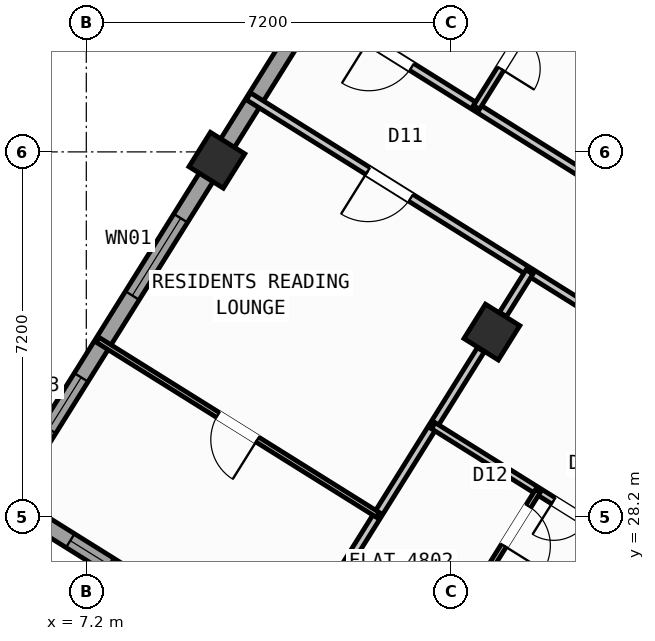
"""IFC4 building model, lengths in metres.
Left out: names, types, materials, properties, quantities, classifications, styles, units other than length and angle.
Written with IfcOpenShell. Run it as: python <this file> out.ifc"""

import sys

from ifc_helpers import new_model, si_unit, direction, frame, frame_2d, origin, origin_2d, place, context, subcontext, project, spatial, rectangle, hollow_rectangle, extrude, source, transform, mapped, element, fill, save


model = new_model("IFC4")
c1 = context("Model", 3, precision=1e-05, world=origin(), true_north=direction((0.0, 1.0)))
c2 = subcontext(c1, "Body", "Model", "MODEL_VIEW")
j1 = project(units=[si_unit("LENGTHUNIT", "METRE"), si_unit("PLANEANGLEUNIT", "RADIAN")], contexts=[c1])
p1 = place(None, origin())
s1 = spatial("IfcSite", under=j1, at=p1, CompositionType="ELEMENT")
p2 = place(p1, origin())
s2 = spatial("IfcBuilding", under=s1, at=p2, CompositionType="ELEMENT")
p3 = place(p2, frame((0.0, 0.0, 191.4)))
s3 = spatial("IfcBuildingStorey", under=s2, at=p3, CompositionType="ELEMENT", Elevation=191.4)
m1 = source(origin(), c2, "Body", "SweptSolid", [
    extrude(hollow_rectangle(XDim=0.8, YDim=0.8, WallThickness=0.032, at=origin_2d()), origin(), (0.0, 0.0, 1.0), 3.6),
])
for number, where, z_axis, x_axis in (
    (1, (15.205, 31.844, 0.0), (0.0, 0.0, 1.0), (-0.848, 0.53, 0.0)),
    (2, (9.777, 35.235, 0.0), (0.0, 0.0, 1.0), (-0.848, 0.53, 0.0)),
):
    element("IfcColumn", number, at=place(p3, frame(where, z_axis=z_axis, x_axis=x_axis)), inside=s3, PredefinedType="COLUMN", context=c2, shape_type="MappedRepresentation", body=[
        mapped(m1, transform((0.0, 0.0, 0.0), scale=1.0)),
    ])
p4 = place(p3, frame((31.76, 12.183, 0.0), z_axis=(0.0, 0.0, 1.0), x_axis=(-0.848047074256, 0.529920899612, 0.0)))
e3 = element("IfcWall", 3, at=p4, inside=s3, PredefinedType="STANDARD", context=c2, shape_type="SweptSolid", body=[
    extrude(rectangle(XDim=30.652, YDim=0.32, at=frame_2d((15.326, 0.0))), origin(), (0.0, 0.0, 1.0), 3.32),
])
p5 = place(p4, frame((15.166, 0.0, 0.0)))
e4 = element("IfcOpeningElement", 4, at=p5, cuts=e3, PredefinedType="OPENING", context=c2, shape_type="SweptSolid", body=[
    extrude(rectangle(XDim=1.2, YDim=2.15, at=frame_2d((0.6, 1.075))), frame((0.0, 0.17, 0.0), z_axis=(0.0, -1.0, 0.0), x_axis=(1.0, 0.0, 0.0)), (0.0, 0.0, 1.0), 0.34),
])
p6 = place(p4, frame((2.015, 0.0, 0.8)))
e5 = element("IfcOpeningElement", 5, at=p6, cuts=e3, PredefinedType="OPENING", context=c2, shape_type="SweptSolid", body=[
    extrude(rectangle(XDim=2.1, YDim=1.55, at=frame_2d((1.05, 0.775))), frame((0.0, 0.17, 0.0), z_axis=(0.0, -1.0, 0.0), x_axis=(1.0, 0.0, 0.0)), (0.0, 0.0, 1.0), 0.34),
])
p7 = place(p4, frame((7.244, 0.0, 0.8)))
e6 = element("IfcOpeningElement", 6, at=p7, cuts=e3, PredefinedType="OPENING", context=c2, shape_type="SweptSolid", body=[
    extrude(rectangle(XDim=2.1, YDim=1.55, at=frame_2d((1.05, 0.775))), frame((0.0, 0.17, 0.0), z_axis=(0.0, -1.0, 0.0), x_axis=(1.0, 0.0, 0.0)), (0.0, 0.0, 1.0), 0.34),
])
p8 = place(p4, frame((12.623, 0.0, 1.0)))
e7 = element("IfcOpeningElement", 7, at=p8, cuts=e3, PredefinedType="OPENING", context=c2, shape_type="SweptSolid", body=[
    extrude(rectangle(XDim=0.9, YDim=1.25, at=frame_2d((0.45, 0.625))), frame((0.0, 0.17, 0.0), z_axis=(0.0, -1.0, 0.0), x_axis=(1.0, 0.0, 0.0)), (0.0, 0.0, 1.0), 0.34),
])
p9 = place(p4, frame((19.565, 0.0, 0.95)))
e8 = element("IfcOpeningElement", 8, at=p9, cuts=e3, PredefinedType="OPENING", context=c2, shape_type="SweptSolid", body=[
    extrude(rectangle(XDim=1.2, YDim=1.4, at=frame_2d((0.6, 0.7))), frame((0.0, 0.17, 0.0), z_axis=(0.0, -1.0, 0.0), x_axis=(1.0, 0.0, 0.0)), (0.0, 0.0, 1.0), 0.34),
])
p10 = place(p4, frame((25.983, 0.0, 1.0)))
e9 = element("IfcOpeningElement", 9, at=p10, cuts=e3, PredefinedType="OPENING", context=c2, shape_type="SweptSolid", body=[
    extrude(rectangle(XDim=0.9, YDim=1.25, at=frame_2d((0.45, 0.625))), frame((0.0, 0.17, 0.0), z_axis=(0.0, -1.0, 0.0), x_axis=(1.0, 0.0, 0.0)), (0.0, 0.0, 1.0), 0.34),
])
p11 = place(p4, frame((28.433, 0.0, 1.0)))
e10 = element("IfcOpeningElement", 10, at=p11, cuts=e3, PredefinedType="OPENING", context=c2, shape_type="SweptSolid", body=[
    extrude(rectangle(XDim=0.9, YDim=1.25, at=frame_2d((0.45, 0.625))), frame((0.0, 0.17, 0.0), z_axis=(0.0, -1.0, 0.0), x_axis=(1.0, 0.0, 0.0)), (0.0, 0.0, 1.0), 0.34),
])
p12 = place(p3, frame((5.7, 28.71, 0.0), z_axis=(0.0, 0.0, 1.0), x_axis=(0.529923711467, 0.8480453172, 0.0)))
e11 = element("IfcWall", 11, at=p12, inside=s3, PredefinedType="STANDARD", context=c2, shape_type="SweptSolid", body=[
    extrude(rectangle(XDim=21.587, YDim=0.32, at=frame_2d((10.794, 0.0))), origin(), (0.0, 0.0, 1.0), 2.795),
])
p13 = place(p12, frame((1.44, 0.0, 0.95)))
e12 = element("IfcOpeningElement", 12, at=p13, cuts=e11, PredefinedType="OPENING", context=c2, shape_type="SweptSolid", body=[
    extrude(rectangle(XDim=1.2, YDim=1.4, at=frame_2d((0.6, 0.7))), frame((0.0, 0.17, 0.0), z_axis=(0.0, -1.0, 0.0), x_axis=(1.0, 0.0, 0.0)), (0.0, 0.0, 1.0), 0.34),
])
p14 = place(p12, frame((4.545, 0.0, 0.85)))
e13 = element("IfcOpeningElement", 13, at=p14, cuts=e11, PredefinedType="OPENING", context=c2, shape_type="SweptSolid", body=[
    extrude(rectangle(XDim=1.8, YDim=1.5, at=frame_2d((0.9, 0.75))), frame((0.0, 0.17, 0.0), z_axis=(0.0, -1.0, 0.0), x_axis=(1.0, 0.0, 0.0)), (0.0, 0.0, 1.0), 0.34),
])
p15 = place(p12, frame((12.139, 0.0, 1.0)))
e14 = element("IfcOpeningElement", 14, at=p15, cuts=e11, PredefinedType="OPENING", context=c2, shape_type="SweptSolid", body=[
    extrude(rectangle(XDim=0.9, YDim=1.25, at=frame_2d((0.45, 0.625))), frame((0.0, 0.17, 0.0), z_axis=(0.0, -1.0, 0.0), x_axis=(1.0, 0.0, 0.0)), (0.0, 0.0, 1.0), 0.34),
])
p16 = place(p12, frame((16.35, 0.0, 0.95)))
e15 = element("IfcOpeningElement", 15, at=p16, cuts=e11, PredefinedType="OPENING", context=c2, shape_type="SweptSolid", body=[
    extrude(rectangle(XDim=1.2, YDim=1.4, at=frame_2d((0.6, 0.7))), frame((0.0, 0.17, 0.0), z_axis=(0.0, -1.0, 0.0), x_axis=(1.0, 0.0, 0.0)), (0.0, 0.0, 1.0), 0.34),
])
p17 = place(p12, frame((18.762, 0.0, 0.95)))
e16 = element("IfcOpeningElement", 16, at=p17, cuts=e11, PredefinedType="OPENING", context=c2, shape_type="SweptSolid", body=[
    extrude(rectangle(XDim=1.2, YDim=1.4, at=frame_2d((0.6, 0.7))), frame((0.0, 0.17, 0.0), z_axis=(0.0, -1.0, 0.0), x_axis=(1.0, 0.0, 0.0)), (0.0, 0.0, 1.0), 0.34),
])
p18 = place(p3, frame((25.754, 29.497, 0.0), z_axis=(0.0, 0.0, 1.0), x_axis=(-0.848045850158, 0.529922858565, 0.0)))
e17 = element("IfcWall", 17, at=p18, inside=s3, PredefinedType="PARTITIONING", context=c2, shape_type="SweptSolid", body=[
    extrude(rectangle(XDim=16.73, YDim=0.16, at=frame_2d((8.365, 0.0))), origin(), (0.0, 0.0, 1.0), 3.31),
])
p19 = place(p18, frame((2.22, 0.0, 0.0)))
e18 = element("IfcOpeningElement", 18, at=p19, cuts=e17, PredefinedType="OPENING", context=c2, shape_type="SweptSolid", body=[
    extrude(rectangle(XDim=0.86, YDim=2.05, at=frame_2d((0.43, 1.025))), frame((0.0, 0.09, 0.0), z_axis=(0.0, -1.0, 0.0), x_axis=(1.0, 0.0, 0.0)), (0.0, 0.0, 1.0), 0.18),
])
p20 = place(p18, frame((6.49, 0.0, 0.0)))
e19 = element("IfcOpeningElement", 19, at=p20, cuts=e17, PredefinedType="OPENING", context=c2, shape_type="SweptSolid", body=[
    extrude(rectangle(XDim=1.0, YDim=2.1, at=frame_2d((0.5, 1.05))), frame((0.0, 0.09, 0.0), z_axis=(0.0, -1.0, 0.0), x_axis=(1.0, 0.0, 0.0)), (0.0, 0.0, 1.0), 0.18),
])
p21 = place(p18, frame((14.304, 0.0, 0.0)))
e20 = element("IfcOpeningElement", 20, at=p21, cuts=e17, PredefinedType="OPENING", context=c2, shape_type="SweptSolid", body=[
    extrude(rectangle(XDim=1.0, YDim=2.1, at=frame_2d((0.5, 1.05))), frame((0.0, 0.09, 0.0), z_axis=(0.0, -1.0, 0.0), x_axis=(1.0, 0.0, 0.0)), (0.0, 0.0, 1.0), 0.18),
])
p22 = place(p3, frame((24.588, 27.631, 0.0), z_axis=(0.0, 0.0, 1.0), x_axis=(-0.848041752158, 0.529929416617, 0.0)))
e21 = element("IfcWall", 21, at=p22, inside=s3, PredefinedType="PARTITIONING", context=c2, shape_type="SweptSolid", body=[
    extrude(rectangle(XDim=16.73, YDim=0.16, at=frame_2d((8.365, 0.0))), origin(), (0.0, 0.0, 1.0), 3.31),
])
p23 = place(p22, frame((2.22, 0.0, 0.0)))
e22 = element("IfcOpeningElement", 22, at=p23, cuts=e21, PredefinedType="OPENING", context=c2, shape_type="SweptSolid", body=[
    extrude(rectangle(XDim=0.86, YDim=2.05, at=frame_2d((0.43, 1.025))), frame((0.0, 0.09, 0.0), z_axis=(0.0, -1.0, 0.0), x_axis=(1.0, 0.0, 0.0)), (0.0, 0.0, 1.0), 0.18),
])
p24 = place(p22, frame((7.82, 0.0, 0.0)))
e23 = element("IfcOpeningElement", 23, at=p24, cuts=e21, PredefinedType="OPENING", context=c2, shape_type="SweptSolid", body=[
    extrude(rectangle(XDim=1.0, YDim=2.1, at=frame_2d((0.5, 1.05))), frame((0.0, 0.09, 0.0), z_axis=(0.0, -1.0, 0.0), x_axis=(1.0, 0.0, 0.0)), (0.0, 0.0, 1.0), 0.18),
])
p25 = place(p22, frame((12.95, 0.0, 0.0)))
e24 = element("IfcOpeningElement", 24, at=p25, cuts=e21, PredefinedType="OPENING", context=c2, shape_type="SweptSolid", body=[
    extrude(rectangle(XDim=1.0, YDim=2.1, at=frame_2d((0.5, 1.05))), frame((0.0, 0.09, 0.0), z_axis=(0.0, -1.0, 0.0), x_axis=(1.0, 0.0, 0.0)), (0.0, 0.0, 1.0), 0.18),
])
p26 = place(p3, frame((15.946, 33.031, 0.0), z_axis=(0.0, 0.0, 1.0), x_axis=(-0.529821225456, -0.848109349704, 0.0)))
e25 = element("IfcWall", 25, at=p26, inside=s3, PredefinedType="PARTITIONING", context=c2, shape_type="SweptSolid", body=[
    extrude(rectangle(XDim=0.988, YDim=0.16, at=frame_2d((0.494, 0.0))), origin(), (0.0, 0.0, 1.0), 2.795),
])
p27 = place(p3, frame((14.986, 31.494, 0.0), z_axis=(0.0, 0.0, 1.0), x_axis=(-0.529907440938, -0.848055484057, 0.0)))
e26 = element("IfcWall", 26, at=p27, inside=s3, PredefinedType="PARTITIONING", context=c2, shape_type="SweptSolid", body=[
    extrude(rectangle(XDim=6.476, YDim=0.16, at=frame_2d((3.238, 0.0))), origin(), (0.0, 0.0, 1.0), 2.795),
])
p28 = place(p3, frame((19.477, 26.603, 0.0), z_axis=(0.0, 0.0, 1.0), x_axis=(-0.848039019877, 0.529933789039, 0.0)))
e27 = element("IfcWall", 27, at=p28, inside=s3, PredefinedType="PLUMBINGWALL", context=c2, shape_type="SweptSolid", body=[
    extrude(rectangle(XDim=6.4, YDim=0.14, at=frame_2d((3.2, 0.0))), origin(), (0.0, 0.0, 1.0), 3.31),
])
p29 = place(p28, frame((2.824, 0.0, 0.0)))
e28 = element("IfcOpeningElement", 28, at=p29, cuts=e27, PredefinedType="OPENING", context=c2, shape_type="SweptSolid", body=[
    extrude(rectangle(XDim=0.78, YDim=2.05, at=frame_2d((0.39, 1.025))), frame((0.0, 0.08, 0.0), z_axis=(0.0, -1.0, 0.0), x_axis=(1.0, 0.0, 0.0)), (0.0, 0.0, 1.0), 0.16),
])
p30 = place(p3, frame((16.112, 28.706, 0.0), z_axis=(0.0, 0.0, 1.0), x_axis=(-0.529916267533, -0.848049968695, 0.0)))
e29 = element("IfcWall", 29, at=p30, inside=s3, PredefinedType="PARTITIONING", context=c2, shape_type="SweptSolid", body=[
    extrude(rectangle(XDim=5.84, YDim=0.11, at=frame_2d((2.92, 0.0))), origin(), (0.0, 0.0, 1.0), 3.31),
])
p31 = place(p30, frame((0.35, 0.0, 0.0)))
e30 = element("IfcOpeningElement", 30, at=p31, cuts=e29, PredefinedType="OPENING", context=c2, shape_type="SweptSolid", body=[
    extrude(rectangle(XDim=0.92, YDim=2.08, at=frame_2d((0.46, 1.04))), frame((0.0, 0.065, 0.0), z_axis=(0.0, -1.0, 0.0), x_axis=(1.0, 0.0, 0.0)), (0.0, 0.0, 1.0), 0.13),
])
p32 = place(p3, frame((12.951, 28.238, 0.0), z_axis=(0.0, 0.0, 1.0), x_axis=(-0.848031959833, 0.529945086874, 0.0)))
e31 = element("IfcWall", 31, at=p32, inside=s3, PredefinedType="PARTITIONING", context=c2, shape_type="SweptSolid", body=[
    extrude(rectangle(XDim=6.52, YDim=0.11, at=frame_2d((3.26, 0.0))), origin(), (0.0, 0.0, 1.0), 3.31),
])
p33 = place(p32, frame((2.8, 0.0, 0.0)))
e32 = element("IfcOpeningElement", 32, at=p33, cuts=e31, PredefinedType="OPENING", context=c2, shape_type="SweptSolid", body=[
    extrude(rectangle(XDim=0.92, YDim=2.08, at=frame_2d((0.46, 1.04))), frame((0.0, 0.065, 0.0), z_axis=(0.0, -1.0, 0.0), x_axis=(1.0, 0.0, 0.0)), (0.0, 0.0, 1.0), 0.13),
])
p34 = place(p3, frame((18.479, 37.084, 0.0), z_axis=(0.0, 0.0, 1.0), x_axis=(-0.848048787466, 0.529918157905, 0.0)))
e33 = element("IfcWall", 33, at=p34, inside=s3, PredefinedType="PLUMBINGWALL", context=c2, shape_type="SweptSolid", body=[
    extrude(rectangle(XDim=6.52, YDim=0.14, at=frame_2d((3.26, 0.0))), origin(), (0.0, 0.0, 1.0), 3.31),
])
p35 = place(p34, frame((2.885, 0.0, 0.0)))
e34 = element("IfcOpeningElement", 34, at=p35, cuts=e33, PredefinedType="OPENING", context=c2, shape_type="SweptSolid", body=[
    extrude(rectangle(XDim=0.78, YDim=2.05, at=frame_2d((0.39, 1.025))), frame((0.0, 0.08, 0.0), z_axis=(0.0, -1.0, 0.0), x_axis=(1.0, 0.0, 0.0)), (0.0, 0.0, 1.0), 0.16),
])
p36 = place(p3, frame((16.268, 38.467, 0.0), z_axis=(0.0, 0.0, 1.0), x_axis=(-0.529913878929, -0.848051461244, 0.0)))
e35 = element("IfcWall", 35, at=p36, inside=s3, PredefinedType="PLUMBINGWALL", context=c2, shape_type="SweptSolid", body=[
    extrude(rectangle(XDim=2.58, YDim=0.14, at=frame_2d((1.29, 0.0))), origin(), (0.0, 0.0, 1.0), 3.31),
])
p37 = place(p36, frame((0.9, 0.0, 0.0)))
e36 = element("IfcOpeningElement", 36, at=p37, cuts=e35, PredefinedType="OPENING", context=c2, shape_type="SweptSolid", body=[
    extrude(rectangle(XDim=0.78, YDim=2.05, at=frame_2d((0.39, 1.025))), frame((0.0, 0.08, 0.0), z_axis=(0.0, -1.0, 0.0), x_axis=(1.0, 0.0, 0.0)), (0.0, 0.0, 1.0), 0.16),
])
m2 = source(origin(), c2, "Body", "SweptSolid", [
    extrude(rectangle(XDim=0.9, YDim=1.25, at=frame_2d((0.45, 0.625))), frame((0.0, 0.03, 0.0), z_axis=(0.0, -1.0, 0.0), x_axis=(1.0, 0.0, 0.0)), (0.0, 0.0, 1.0), 0.06),
])
p38 = place(p11, origin())
e37 = element("IfcWindow", 37, at=p38, inside=s3, PartitioningType="SINGLE_PANEL", PredefinedType="WINDOW", context=c2, shape_type="MappedRepresentation", body=[
    mapped(m2, transform((0.0, 0.0, 0.0), scale=1.0)),
])
fill(e10, e37)
m3 = source(origin(), c2, "Body", "SweptSolid", [
    extrude(rectangle(XDim=1.2, YDim=1.4, at=frame_2d((0.6, 0.7))), frame((0.0, 0.03, 0.0), z_axis=(0.0, -1.0, 0.0), x_axis=(1.0, 0.0, 0.0)), (0.0, 0.0, 1.0), 0.06),
])
p39 = place(p13, origin())
e38 = element("IfcWindow", 38, at=p39, inside=s3, PartitioningType="SINGLE_PANEL", PredefinedType="WINDOW", context=c2, shape_type="MappedRepresentation", body=[
    mapped(m3, transform((0.0, 0.0, 0.0), scale=1.0)),
])
fill(e12, e38)
m4 = source(origin(), c2, "Body", "SweptSolid", [
    extrude(rectangle(XDim=1.8, YDim=1.5, at=frame_2d((0.9, 0.75))), frame((0.0, 0.03, 0.0), z_axis=(0.0, -1.0, 0.0), x_axis=(1.0, 0.0, 0.0)), (0.0, 0.0, 1.0), 0.06),
])
p40 = place(p14, origin())
e39 = element("IfcWindow", 39, at=p40, inside=s3, PartitioningType="SINGLE_PANEL", PredefinedType="WINDOW", context=c2, shape_type="MappedRepresentation", body=[
    mapped(m4, transform((0.0, 0.0, 0.0), scale=1.0)),
])
fill(e13, e39)
m5 = source(origin(), c2, "Body", "SweptSolid", [
    extrude(rectangle(XDim=0.92, YDim=2.08, at=frame_2d((0.46, 1.04))), frame((0.0, 0.025, 0.0), z_axis=(0.0, -1.0, 0.0), x_axis=(1.0, 0.0, 0.0)), (0.0, 0.0, 1.0), 0.05),
])
p41 = place(p31, origin())
e40 = element("IfcDoor", 40, at=p41, inside=s3, OperationType="SINGLE_SWING_RIGHT", PredefinedType="DOOR", context=c2, shape_type="MappedRepresentation", body=[
    mapped(m5, transform((0.0, 0.0, 0.0), scale=1.0)),
])
fill(e30, e40)
m6 = source(origin(), c2, "Body", "SweptSolid", [
    extrude(rectangle(XDim=0.78, YDim=2.05, at=frame_2d((0.39, 1.025))), frame((0.0, 0.025, 0.0), z_axis=(0.0, -1.0, 0.0), x_axis=(1.0, 0.0, 0.0)), (0.0, 0.0, 1.0), 0.05),
])
p42 = place(p29, origin())
e41 = element("IfcDoor", 41, at=p42, inside=s3, OperationType="SINGLE_SWING_RIGHT", PredefinedType="DOOR", context=c2, shape_type="MappedRepresentation", body=[
    mapped(m6, transform((0.0, 0.0, 0.0), scale=1.0)),
])
fill(e28, e41)
m7 = source(origin(), c2, "Body", "SweptSolid", [
    extrude(rectangle(XDim=1.0, YDim=2.1, at=frame_2d((0.5, 1.05))), frame((0.0, 0.025, 0.0), z_axis=(0.0, -1.0, 0.0), x_axis=(1.0, 0.0, 0.0)), (0.0, 0.0, 1.0), 0.05),
])
p43 = place(p25, origin())
e42 = element("IfcDoor", 42, at=p43, inside=s3, OperationType="SINGLE_SWING_RIGHT", PredefinedType="DOOR", context=c2, shape_type="MappedRepresentation", body=[
    mapped(m7, transform((0.0, 0.0, 0.0), scale=1.0)),
])
fill(e24, e42)
p44 = place(p33, origin())
e43 = element("IfcDoor", 43, at=p44, inside=s3, OperationType="SINGLE_SWING_LEFT", PredefinedType="DOOR", context=c2, shape_type="MappedRepresentation", body=[
    mapped(m5, transform((0.0, 0.0, 0.0), scale=1.0)),
])
fill(e32, e43)
p45 = place(p21, origin())
e44 = element("IfcDoor", 44, at=p45, inside=s3, OperationType="SINGLE_SWING_RIGHT", PredefinedType="DOOR", context=c2, shape_type="MappedRepresentation", body=[
    mapped(m7, transform((0.0, 0.0, 0.0), scale=1.0)),
])
fill(e20, e44)
p46 = place(p37, origin())
e45 = element("IfcDoor", 45, at=p46, inside=s3, OperationType="SINGLE_SWING_RIGHT", PredefinedType="DOOR", context=c2, shape_type="MappedRepresentation", body=[
    mapped(m6, transform((0.0, 0.0, 0.0), scale=1.0)),
])
fill(e36, e45)
save(model, sys.argv[1])
